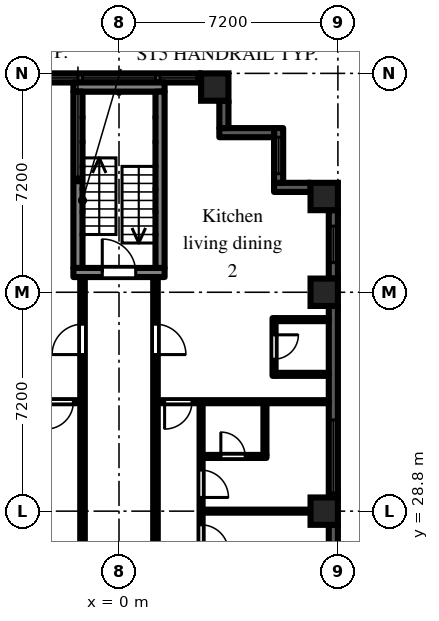
"""IFC4 building model, lengths in metres.
Left out: names, types, materials, properties, quantities, classifications, styles, units other than length and angle.
Written with IfcOpenShell. Run it as: python <this file> out.ifc"""

import sys

from ifc_helpers import new_model, si_unit, direction, frame, frame_2d, origin, origin_2d, place, context, subcontext, project, spatial, rectangle, extrude, element, fill, save


model = new_model("IFC4")
c1 = context("Model", 3, precision=1e-05, world=origin(), true_north=direction((0.0, 1.0)))
c2 = subcontext(c1, "Body", "Model", "MODEL_VIEW")
j1 = project(units=[si_unit("LENGTHUNIT", "METRE"), si_unit("PLANEANGLEUNIT", "RADIAN")], contexts=[c1])
p1 = place(None, origin())
s1 = spatial("IfcSite", under=j1, at=p1, CompositionType="ELEMENT")
p2 = place(p1, origin())
s2 = spatial("IfcBuilding", under=s1, at=p2, CompositionType="ELEMENT")
p3 = place(p2, frame((0.0, 0.0, 11.7)))
s3 = spatial("IfcBuildingStorey", under=s2, at=p3, CompositionType="ELEMENT", Elevation=11.7)
for number, where, z_axis, x_axis in (
    (1, (3.15, 42.75, 0.0), (0.0, 0.0, 1.0), (1.0, 0.0, 0.0)),
    (2, (6.75, 28.8, 0.0), (0.0, 0.0, 1.0), (1.0, 0.0, 0.0)),
    (3, (6.75, 36.0, 0.0), (0.0, 0.0, 1.0), (1.0, 0.0, 0.0)),
    (4, (6.75, 39.15, 0.0), (0.0, 0.0, 1.0), (1.0, 0.0, 0.0)),
):
    element("IfcColumn", number, at=place(p3, frame(where, z_axis=z_axis, x_axis=x_axis)), inside=s3, PredefinedType="COLUMN", context=c2, shape_type="SweptSolid", body=[
        extrude(rectangle(XDim=0.9, YDim=0.9, at=origin_2d()), origin(), (0.0, 0.0, 1.0), 3.0),
    ])
p4 = place(p3, frame((7.05, 22.05, 0.0), z_axis=(0.0, 0.0, 1.0), x_axis=(0.0, 1.0, 0.0)))
e5 = element("IfcWall", 5, at=p4, inside=s3, PredefinedType="SOLIDWALL", context=c2, shape_type="SweptSolid", body=[
    extrude(rectangle(XDim=6.3, YDim=0.3, at=frame_2d((3.15, 0.0))), origin(), (0.0, 0.0, 1.0), 2.1),
])
p5 = place(p4, frame((0.975, 0.0, 0.2)))
e6 = element("IfcOpeningElement", 6, at=p5, cuts=e5, PredefinedType="OPENING", context=c2, shape_type="SweptSolid", body=[
    extrude(rectangle(XDim=1.2, YDim=1.85, at=frame_2d((0.6, 0.925))), frame((0.0, 0.16, 0.0), z_axis=(0.0, -1.0, 0.0), x_axis=(1.0, 0.0, 0.0)), (0.0, 0.0, 1.0), 0.32),
])
p6 = place(p4, frame((4.125, 0.0, 0.2)))
e7 = element("IfcOpeningElement", 7, at=p6, cuts=e5, PredefinedType="OPENING", context=c2, shape_type="SweptSolid", body=[
    extrude(rectangle(XDim=1.2, YDim=1.85, at=frame_2d((0.6, 0.925))), frame((0.0, 0.16, 0.0), z_axis=(0.0, -1.0, 0.0), x_axis=(1.0, 0.0, 0.0)), (0.0, 0.0, 1.0), 0.32),
])
p7 = place(p3, frame((7.05, 29.25, 0.0), z_axis=(0.0, 0.0, 1.0), x_axis=(0.0, 1.0, 0.0)))
e8 = element("IfcWall", 8, at=p7, inside=s3, PredefinedType="SOLIDWALL", context=c2, shape_type="SweptSolid", body=[
    extrude(rectangle(XDim=6.3, YDim=0.3, at=frame_2d((3.15, 0.0))), origin(), (0.0, 0.0, 1.0), 2.1),
])
p8 = place(p7, frame((0.15, 0.0, 0.2)))
e9 = element("IfcOpeningElement", 9, at=p8, cuts=e8, PredefinedType="OPENING", context=c2, shape_type="SweptSolid", body=[
    extrude(rectangle(XDim=2.4, YDim=1.85, at=frame_2d((1.2, 0.925))), frame((0.0, 0.16, 0.0), z_axis=(0.0, -1.0, 0.0), x_axis=(1.0, 0.0, 0.0)), (0.0, 0.0, 1.0), 0.32),
])
p9 = place(p3, frame((7.05, 36.45, 0.0), z_axis=(0.0, 0.0, 1.0), x_axis=(0.0, 1.0, 0.0)))
e10 = element("IfcWall", 10, at=p9, inside=s3, PredefinedType="SOLIDWALL", context=c2, shape_type="SweptSolid", body=[
    extrude(rectangle(XDim=2.25, YDim=0.3, at=frame_2d((1.125, 0.0))), origin(), (0.0, 0.0, 1.0), 2.1),
])
p10 = place(p9, frame((0.525, 0.0, 0.2)))
e11 = element("IfcOpeningElement", 11, at=p10, cuts=e10, PredefinedType="OPENING", context=c2, shape_type="SweptSolid", body=[
    extrude(rectangle(XDim=1.2, YDim=1.85, at=frame_2d((0.6, 0.925))), frame((0.0, 0.16, 0.0), z_axis=(0.0, -1.0, 0.0), x_axis=(1.0, 0.0, 0.0)), (0.0, 0.0, 1.0), 0.32),
])
p11 = place(p3, frame((6.3, 39.45, 0.0), z_axis=(0.0, 0.0, 1.0), x_axis=(-1.0, 0.0, 0.0)))
e12 = element("IfcWall", 12, at=p11, inside=s3, PredefinedType="SOLIDWALL", context=c2, shape_type="SweptSolid", body=[
    extrude(rectangle(XDim=1.2, YDim=0.3, at=frame_2d((0.6, 0.0))), origin(), (0.0, 0.0, 1.0), 2.575),
])
p12 = place(p3, frame((5.25, 39.6, 0.0), z_axis=(0.0, 0.0, 1.0), x_axis=(0.0, 1.0, 0.0)))
e13 = element("IfcWall", 13, at=p12, inside=s3, PredefinedType="SOLIDWALL", context=c2, shape_type="SweptSolid", body=[
    extrude(rectangle(XDim=1.8, YDim=0.3, at=frame_2d((0.9, 0.0))), origin(), (0.0, 0.0, 1.0), 2.575),
])
p13 = place(p12, frame((0.3, 0.0, 0.2)))
e14 = element("IfcOpeningElement", 14, at=p13, cuts=e13, PredefinedType="OPENING", context=c2, shape_type="SweptSolid", body=[
    extrude(rectangle(XDim=1.2, YDim=1.85, at=frame_2d((0.6, 0.925))), frame((0.0, 0.16, 0.0), z_axis=(0.0, -1.0, 0.0), x_axis=(1.0, 0.0, 0.0)), (0.0, 0.0, 1.0), 0.32),
])
p14 = place(p3, frame((5.1, 41.25, 0.0), z_axis=(0.0, 0.0, 1.0), x_axis=(-1.0, 0.0, 0.0)))
e15 = element("IfcWall", 15, at=p14, inside=s3, PredefinedType="SOLIDWALL", context=c2, shape_type="SweptSolid", body=[
    extrude(rectangle(XDim=1.8, YDim=0.3, at=frame_2d((0.9, 0.0))), origin(), (0.0, 0.0, 1.0), 2.575),
])
p15 = place(p3, frame((3.45, 41.4, 0.0), z_axis=(0.0, 0.0, 1.0), x_axis=(0.0, 1.0, 0.0)))
e16 = element("IfcWall", 16, at=p15, inside=s3, PredefinedType="SOLIDWALL", context=c2, shape_type="SweptSolid", body=[
    extrude(rectangle(XDim=0.9, YDim=0.3, at=frame_2d((0.45, 0.0))), origin(), (0.0, 0.0, 1.0), 2.575),
])
p16 = place(p3, frame((2.7, 43.05, 0.0), z_axis=(0.0, 0.0, 1.0), x_axis=(-1.0, 0.0, 0.0)))
e17 = element("IfcWall", 17, at=p16, inside=s3, PredefinedType="SOLIDWALL", context=c2, shape_type="SweptSolid", body=[
    extrude(rectangle(XDim=5.4, YDim=0.3, at=frame_2d((2.7, 0.0))), origin(), (0.0, 0.0, 1.0), 2.1),
])
p17 = place(p16, frame((1.5, 0.0, 0.2)))
e18 = element("IfcOpeningElement", 18, at=p17, cuts=e17, PredefinedType="OPENING", context=c2, shape_type="SweptSolid", body=[
    extrude(rectangle(XDim=2.4, YDim=1.85, at=frame_2d((1.2, 0.925))), frame((0.0, 0.16, 0.0), z_axis=(0.0, -1.0, 0.0), x_axis=(1.0, 0.0, 0.0)), (0.0, 0.0, 1.0), 0.32),
])
p18 = place(p16, frame((0.15, 0.0, 0.2)))
e19 = element("IfcOpeningElement", 19, at=p18, cuts=e17, PredefinedType="OPENING", context=c2, shape_type="SweptSolid", body=[
    extrude(rectangle(XDim=1.2, YDim=1.85, at=frame_2d((0.6, 0.925))), frame((0.0, 0.16, 0.0), z_axis=(0.0, -1.0, 0.0), x_axis=(1.0, 0.0, 0.0)), (0.0, 0.0, 1.0), 0.32),
])
p19 = place(p16, frame((4.05, 0.0, 0.2)))
e20 = element("IfcOpeningElement", 20, at=p19, cuts=e17, PredefinedType="OPENING", context=c2, shape_type="SweptSolid", body=[
    extrude(rectangle(XDim=1.2, YDim=1.85, at=frame_2d((0.6, 0.925))), frame((0.0, 0.16, 0.0), z_axis=(0.0, -1.0, 0.0), x_axis=(1.0, 0.0, 0.0)), (0.0, 0.0, 1.0), 0.32),
])
p20 = place(p3, frame((-1.5, 36.65, 0.0), z_axis=(0.0, 0.0, 1.0), x_axis=(1.0, 0.0, 0.0)))
e21 = element("IfcWall", 21, at=p20, inside=s3, PredefinedType="SHEAR", context=c2, shape_type="SweptSolid", body=[
    extrude(rectangle(XDim=3.0, YDim=0.3, at=frame_2d((1.5, 0.0))), origin(), (0.0, 0.0, 1.0), 2.575),
])
p21 = place(p20, frame((0.95, 0.0, 0.0)))
e22 = element("IfcOpeningElement", 22, at=p21, cuts=e21, PredefinedType="OPENING", context=c2, shape_type="SweptSolid", body=[
    extrude(rectangle(XDim=1.1, YDim=2.1, at=frame_2d((0.55, 1.05))), frame((0.0, 0.16, 0.0), z_axis=(0.0, -1.0, 0.0), x_axis=(1.0, 0.0, 0.0)), (0.0, 0.0, 1.0), 0.32),
])
p22 = place(p3, frame((-1.5, 42.75, 0.0), z_axis=(0.0, 0.0, 1.0), x_axis=(1.0, 0.0, 0.0)))
e23 = element("IfcWall", 23, at=p22, inside=s3, PredefinedType="SHEAR", context=c2, shape_type="SweptSolid", body=[
    extrude(rectangle(XDim=3.0, YDim=0.3, at=frame_2d((1.5, 0.0))), origin(), (0.0, 0.0, 1.0), 2.575),
])
for number, where, z_axis, x_axis in (
    (24, (-1.35, 36.8, 0.0), (0.0, 0.0, 1.0), (0.0, 1.0, 0.0)),
    (25, (1.35, 36.8, 0.0), (0.0, 0.0, 1.0), (0.0, 1.0, 0.0)),
):
    element("IfcWall", number, at=place(p3, frame(where, z_axis=z_axis, x_axis=x_axis)), inside=s3, PredefinedType="SHEAR", context=c2, shape_type="SweptSolid", body=[
        extrude(rectangle(XDim=5.8, YDim=0.3, at=frame_2d((2.9, 0.0))), origin(), (0.0, 0.0, 1.0), 2.575),
    ])
p23 = place(p3, frame((-6.9, 32.4, 0.0), z_axis=(0.0, 0.0, 1.0), x_axis=(1.0, 0.0, 0.0)))
e26 = element("IfcWall", 26, at=p23, inside=s3, PredefinedType="PARTITIONING", context=c2, shape_type="SweptSolid", body=[
    extrude(rectangle(XDim=5.625, YDim=0.1, at=frame_2d((2.812, 0.0))), origin(), (0.0, 0.0, 1.0), 2.575),
])
p24 = place(p23, frame((4.5, 0.0, 0.0)))
e27 = element("IfcOpeningElement", 27, at=p24, cuts=e26, PredefinedType="OPENING", context=c2, shape_type="SweptSolid", body=[
    extrude(rectangle(XDim=0.9, YDim=2.1, at=frame_2d((0.45, 1.05))), frame((0.0, 0.06, 0.0), z_axis=(0.0, -1.0, 0.0), x_axis=(1.0, 0.0, 0.0)), (0.0, 0.0, 1.0), 0.12),
])
p25 = place(p3, frame((-1.2, 1.125, 0.0), z_axis=(0.0, 0.0, 1.0), x_axis=(0.0, 1.0, 0.0)))
e28 = element("IfcWall", 28, at=p25, inside=s3, PredefinedType="PARTITIONING", context=c2, shape_type="SweptSolid", body=[
    extrude(rectangle(XDim=35.375, YDim=0.15, at=frame_2d((17.688, 0.0))), origin(), (0.0, 0.0, 1.0), 2.575),
])
p26 = place(p25, frame((2.625, 0.0, 0.0)))
e29 = element("IfcOpeningElement", 29, at=p26, cuts=e28, PredefinedType="OPENING", context=c2, shape_type="SweptSolid", body=[
    extrude(rectangle(XDim=0.9, YDim=2.1, at=frame_2d((0.45, 1.05))), frame((0.0, 0.085, 0.0), z_axis=(0.0, -1.0, 0.0), x_axis=(1.0, 0.0, 0.0)), (0.0, 0.0, 1.0), 0.17),
])
p27 = place(p25, frame((11.025, 0.0, 0.0)))
e30 = element("IfcOpeningElement", 30, at=p27, cuts=e28, PredefinedType="OPENING", context=c2, shape_type="SweptSolid", body=[
    extrude(rectangle(XDim=0.9, YDim=2.1, at=frame_2d((0.45, 1.05))), frame((0.0, 0.085, 0.0), z_axis=(0.0, -1.0, 0.0), x_axis=(1.0, 0.0, 0.0)), (0.0, 0.0, 1.0), 0.17),
])
p28 = place(p25, frame((32.825, 0.0, 0.0)))
e31 = element("IfcOpeningElement", 31, at=p28, cuts=e28, PredefinedType="OPENING", context=c2, shape_type="SweptSolid", body=[
    extrude(rectangle(XDim=1.0, YDim=2.1, at=frame_2d((0.5, 1.05))), frame((0.0, 0.085, 0.0), z_axis=(0.0, -1.0, 0.0), x_axis=(1.0, 0.0, 0.0)), (0.0, 0.0, 1.0), 0.17),
])
p29 = place(p3, frame((1.2, 1.125, 0.0), z_axis=(0.0, 0.0, 1.0), x_axis=(0.0, 1.0, 0.0)))
e32 = element("IfcWall", 32, at=p29, inside=s3, PredefinedType="PARTITIONING", context=c2, shape_type="SweptSolid", body=[
    extrude(rectangle(XDim=35.375, YDim=0.15, at=frame_2d((17.688, 0.0))), origin(), (0.0, 0.0, 1.0), 2.575),
])
p30 = place(p29, frame((2.625, 0.0, 0.0)))
e33 = element("IfcOpeningElement", 33, at=p30, cuts=e32, PredefinedType="OPENING", context=c2, shape_type="SweptSolid", body=[
    extrude(rectangle(XDim=0.9, YDim=2.1, at=frame_2d((0.45, 1.05))), frame((0.0, 0.085, 0.0), z_axis=(0.0, -1.0, 0.0), x_axis=(1.0, 0.0, 0.0)), (0.0, 0.0, 1.0), 0.17),
])
p31 = place(p29, frame((11.425, 0.0, 0.0)))
e34 = element("IfcOpeningElement", 34, at=p31, cuts=e32, PredefinedType="OPENING", context=c2, shape_type="SweptSolid", body=[
    extrude(rectangle(XDim=0.9, YDim=2.1, at=frame_2d((0.45, 1.05))), frame((0.0, 0.085, 0.0), z_axis=(0.0, -1.0, 0.0), x_axis=(1.0, 0.0, 0.0)), (0.0, 0.0, 1.0), 0.17),
])
p32 = place(p29, frame((7.825, 0.0, 0.0)))
e35 = element("IfcOpeningElement", 35, at=p32, cuts=e32, PredefinedType="OPENING", context=c2, shape_type="SweptSolid", body=[
    extrude(rectangle(XDim=0.9, YDim=2.1, at=frame_2d((0.45, 1.05))), frame((0.0, 0.085, 0.0), z_axis=(0.0, -1.0, 0.0), x_axis=(1.0, 0.0, 0.0)), (0.0, 0.0, 1.0), 0.17),
])
p33 = place(p29, frame((32.825, 0.0, 0.0)))
e36 = element("IfcOpeningElement", 36, at=p33, cuts=e32, PredefinedType="OPENING", context=c2, shape_type="SweptSolid", body=[
    extrude(rectangle(XDim=1.0, YDim=2.1, at=frame_2d((0.5, 1.05))), frame((0.0, 0.085, 0.0), z_axis=(0.0, -1.0, 0.0), x_axis=(1.0, 0.0, 0.0)), (0.0, 0.0, 1.0), 0.17),
])
p34 = place(p3, frame((1.275, 32.4, 0.0), z_axis=(0.0, 0.0, 1.0), x_axis=(1.0, 0.0, 0.0)))
e37 = element("IfcWall", 37, at=p34, inside=s3, PredefinedType="PARTITIONING", context=c2, shape_type="SweptSolid", body=[
    extrude(rectangle(XDim=5.625, YDim=0.1, at=frame_2d((2.812, 0.0))), origin(), (0.0, 0.0, 1.0), 2.575),
])
p35 = place(p34, frame((0.225, 0.0, 0.0)))
e38 = element("IfcOpeningElement", 38, at=p35, cuts=e37, PredefinedType="OPENING", context=c2, shape_type="SweptSolid", body=[
    extrude(rectangle(XDim=0.9, YDim=2.1, at=frame_2d((0.45, 1.05))), frame((0.0, 0.06, 0.0), z_axis=(0.0, -1.0, 0.0), x_axis=(1.0, 0.0, 0.0)), (0.0, 0.0, 1.0), 0.12),
])
p36 = place(p3, frame((2.7, 14.462, 0.0), z_axis=(0.0, 0.0, 1.0), x_axis=(0.0, 1.0, 0.0)))
e39 = element("IfcWall", 39, at=p36, inside=s3, PredefinedType="PARTITIONING", context=c2, shape_type="SweptSolid", body=[
    extrude(rectangle(XDim=17.888, YDim=0.1, at=frame_2d((8.944, 0.0))), origin(), (0.0, 0.0, 1.0), 2.575),
])
p37 = place(p36, frame((2.188, 0.0, 0.0)))
e40 = element("IfcOpeningElement", 40, at=p37, cuts=e39, PredefinedType="OPENING", context=c2, shape_type="SweptSolid", body=[
    extrude(rectangle(XDim=0.9, YDim=2.1, at=frame_2d((0.45, 1.05))), frame((0.0, 0.06, 0.0), z_axis=(0.0, -1.0, 0.0), x_axis=(1.0, 0.0, 0.0)), (0.0, 0.0, 1.0), 0.12),
])
p38 = place(p36, frame((5.788, 0.0, 0.0)))
e41 = element("IfcOpeningElement", 41, at=p38, cuts=e39, PredefinedType="OPENING", context=c2, shape_type="SweptSolid", body=[
    extrude(rectangle(XDim=0.9, YDim=2.1, at=frame_2d((0.45, 1.05))), frame((0.0, 0.06, 0.0), z_axis=(0.0, -1.0, 0.0), x_axis=(1.0, 0.0, 0.0)), (0.0, 0.0, 1.0), 0.12),
])
p39 = place(p36, frame((7.587, 0.0, 0.0)))
e42 = element("IfcOpeningElement", 42, at=p39, cuts=e39, PredefinedType="OPENING", context=c2, shape_type="SweptSolid", body=[
    extrude(rectangle(XDim=0.9, YDim=2.1, at=frame_2d((0.45, 1.05))), frame((0.0, 0.06, 0.0), z_axis=(0.0, -1.0, 0.0), x_axis=(1.0, 0.0, 0.0)), (0.0, 0.0, 1.0), 0.12),
])
p40 = place(p36, frame((12.988, 0.0, 0.0)))
e43 = element("IfcOpeningElement", 43, at=p40, cuts=e39, PredefinedType="OPENING", context=c2, shape_type="SweptSolid", body=[
    extrude(rectangle(XDim=0.9, YDim=2.1, at=frame_2d((0.45, 1.05))), frame((0.0, 0.06, 0.0), z_axis=(0.0, -1.0, 0.0), x_axis=(1.0, 0.0, 0.0)), (0.0, 0.0, 1.0), 0.12),
])
p41 = place(p36, frame((14.788, 0.0, 0.0)))
e44 = element("IfcOpeningElement", 44, at=p41, cuts=e39, PredefinedType="OPENING", context=c2, shape_type="SweptSolid", body=[
    extrude(rectangle(XDim=0.9, YDim=2.1, at=frame_2d((0.45, 1.05))), frame((0.0, 0.06, 0.0), z_axis=(0.0, -1.0, 0.0), x_axis=(1.0, 0.0, 0.0)), (0.0, 0.0, 1.0), 0.12),
])
p42 = place(p3, frame((2.75, 28.8, 0.0), z_axis=(0.0, 0.0, 1.0), x_axis=(1.0, 0.0, 0.0)))
e45 = element("IfcWall", 45, at=p42, inside=s3, PredefinedType="PARTITIONING", context=c2, shape_type="SweptSolid", body=[
    extrude(rectangle(XDim=4.15, YDim=0.1, at=frame_2d((2.075, 0.0))), origin(), (0.0, 0.0, 1.0), 2.575),
])
p43 = place(p3, frame((2.75, 30.6, 0.0), z_axis=(0.0, 0.0, 1.0), x_axis=(1.0, 0.0, 0.0)))
e46 = element("IfcWall", 46, at=p43, inside=s3, PredefinedType="PARTITIONING", context=c2, shape_type="SweptSolid", body=[
    extrude(rectangle(XDim=2.1, YDim=0.1, at=frame_2d((1.05, 0.0))), origin(), (0.0, 0.0, 1.0), 2.575),
])
p44 = place(p43, frame((0.6, 0.0, 0.0)))
e47 = element("IfcOpeningElement", 47, at=p44, cuts=e46, PredefinedType="OPENING", context=c2, shape_type="SweptSolid", body=[
    extrude(rectangle(XDim=0.8, YDim=2.1, at=frame_2d((0.4, 1.05))), frame((0.0, 0.06, 0.0), z_axis=(0.0, -1.0, 0.0), x_axis=(1.0, 0.0, 0.0)), (0.0, 0.0, 1.0), 0.12),
])
p45 = place(p3, frame((4.8, 30.65, 0.0), z_axis=(0.0, 0.0, 1.0), x_axis=(0.0, 1.0, 0.0)))
e48 = element("IfcWall", 48, at=p45, inside=s3, PredefinedType="PARTITIONING", context=c2, shape_type="SweptSolid", body=[
    extrude(rectangle(XDim=1.7, YDim=0.1, at=frame_2d((0.85, 0.0))), origin(), (0.0, 0.0, 1.0), 2.575),
])
p46 = place(p3, frame((5.1, 33.25, 0.0), z_axis=(0.0, 0.0, 1.0), x_axis=(0.0, 1.0, 0.0)))
e49 = element("IfcWall", 49, at=p46, inside=s3, PredefinedType="PARTITIONING", context=c2, shape_type="SweptSolid", body=[
    extrude(rectangle(XDim=1.9, YDim=0.1, at=frame_2d((0.95, 0.0))), origin(), (0.0, 0.0, 1.0), 2.575),
])
p47 = place(p46, frame((0.55, 0.0, 0.0)))
e50 = element("IfcOpeningElement", 50, at=p47, cuts=e49, PredefinedType="OPENING", context=c2, shape_type="SweptSolid", body=[
    extrude(rectangle(XDim=0.8, YDim=2.1, at=frame_2d((0.4, 1.05))), frame((0.0, 0.06, 0.0), z_axis=(0.0, -1.0, 0.0), x_axis=(1.0, 0.0, 0.0)), (0.0, 0.0, 1.0), 0.12),
])
for number, where, z_axis, x_axis in (
    (51, (5.15, 33.3, 0.0), (0.0, 0.0, 1.0), (1.0, 0.0, 0.0)),
    (52, (5.15, 35.1, 0.0), (0.0, 0.0, 1.0), (1.0, 0.0, 0.0)),
):
    element("IfcWall", number, at=place(p3, frame(where, z_axis=z_axis, x_axis=x_axis)), inside=s3, PredefinedType="PARTITIONING", context=c2, shape_type="SweptSolid", body=[
        extrude(rectangle(XDim=1.75, YDim=0.1, at=frame_2d((0.875, 0.0))), origin(), (0.0, 0.0, 1.0), 2.575),
    ])
p48 = place(p8, origin())
e53 = element("IfcWindow", 53, at=p48, inside=s3, PartitioningType="SINGLE_PANEL", PredefinedType="WINDOW", context=c2, shape_type="SweptSolid", body=[
    extrude(rectangle(XDim=2.4, YDim=1.85, at=frame_2d((1.2, 0.925))), frame((0.0, 0.03, 0.0), z_axis=(0.0, -1.0, 0.0), x_axis=(1.0, 0.0, 0.0)), (0.0, 0.0, 1.0), 0.06),
])
fill(e9, e53)
p49 = place(p10, origin())
e54 = element("IfcWindow", 54, at=p49, inside=s3, PartitioningType="SINGLE_PANEL", PredefinedType="WINDOW", context=c2, shape_type="SweptSolid", body=[
    extrude(rectangle(XDim=1.2, YDim=1.85, at=frame_2d((0.6, 0.925))), frame((0.0, 0.03, 0.0), z_axis=(0.0, -1.0, 0.0), x_axis=(1.0, 0.0, 0.0)), (0.0, 0.0, 1.0), 0.06),
])
fill(e11, e54)
p50 = place(p13, origin())
e55 = element("IfcWindow", 55, at=p50, inside=s3, PartitioningType="SINGLE_PANEL", PredefinedType="WINDOW", context=c2, shape_type="SweptSolid", body=[
    extrude(rectangle(XDim=1.2, YDim=1.85, at=frame_2d((0.6, 0.925))), frame((0.0, 0.03, 0.0), z_axis=(0.0, -1.0, 0.0), x_axis=(1.0, 0.0, 0.0)), (0.0, 0.0, 1.0), 0.06),
])
fill(e14, e55)
p51 = place(p17, origin())
e56 = element("IfcWindow", 56, at=p51, inside=s3, PartitioningType="SINGLE_PANEL", PredefinedType="WINDOW", context=c2, shape_type="SweptSolid", body=[
    extrude(rectangle(XDim=2.4, YDim=1.85, at=frame_2d((1.2, 0.925))), frame((0.0, 0.03, 0.0), z_axis=(0.0, -1.0, 0.0), x_axis=(1.0, 0.0, 0.0)), (0.0, 0.0, 1.0), 0.06),
])
fill(e18, e56)
p52 = place(p18, origin())
e57 = element("IfcWindow", 57, at=p52, inside=s3, PartitioningType="SINGLE_PANEL", PredefinedType="WINDOW", context=c2, shape_type="SweptSolid", body=[
    extrude(rectangle(XDim=1.2, YDim=1.85, at=frame_2d((0.6, 0.925))), frame((0.0, 0.03, 0.0), z_axis=(0.0, -1.0, 0.0), x_axis=(1.0, 0.0, 0.0)), (0.0, 0.0, 1.0), 0.06),
])
fill(e19, e57)
p53 = place(p19, origin())
e58 = element("IfcWindow", 58, at=p53, inside=s3, PartitioningType="SINGLE_PANEL", PredefinedType="WINDOW", context=c2, shape_type="SweptSolid", body=[
    extrude(rectangle(XDim=1.2, YDim=1.85, at=frame_2d((0.6, 0.925))), frame((0.0, 0.03, 0.0), z_axis=(0.0, -1.0, 0.0), x_axis=(1.0, 0.0, 0.0)), (0.0, 0.0, 1.0), 0.06),
])
fill(e20, e58)
p54 = place(p21, origin())
e59 = element("IfcDoor", 59, at=p54, inside=s3, OperationType="SINGLE_SWING_LEFT", PredefinedType="DOOR", context=c2, shape_type="SweptSolid", body=[
    extrude(rectangle(XDim=1.1, YDim=2.1, at=frame_2d((0.55, 1.05))), frame((0.0, 0.025, 0.0), z_axis=(0.0, -1.0, 0.0), x_axis=(1.0, 0.0, 0.0)), (0.0, 0.0, 1.0), 0.05),
])
fill(e22, e59)
p55 = place(p28, origin())
e60 = element("IfcDoor", 60, at=p55, inside=s3, OperationType="SINGLE_SWING_LEFT", PredefinedType="DOOR", context=c2, shape_type="SweptSolid", body=[
    extrude(rectangle(XDim=1.0, YDim=2.1, at=frame_2d((0.5, 1.05))), frame((0.0, 0.025, 0.0), z_axis=(0.0, -1.0, 0.0), x_axis=(1.0, 0.0, 0.0)), (0.0, 0.0, 1.0), 0.05),
])
fill(e31, e60)
p56 = place(p24, frame((0.9, 0.0, 0.0), z_axis=(0.0, 0.0, 1.0), x_axis=(-1.0, 0.0, 0.0)))
e61 = element("IfcDoor", 61, at=p56, inside=s3, OperationType="SINGLE_SWING_RIGHT", PredefinedType="DOOR", context=c2, shape_type="SweptSolid", body=[
    extrude(rectangle(XDim=0.9, YDim=2.1, at=frame_2d((0.45, 1.05))), frame((0.0, 0.025, 0.0), z_axis=(0.0, -1.0, 0.0), x_axis=(1.0, 0.0, 0.0)), (0.0, 0.0, 1.0), 0.05),
])
fill(e27, e61)
p57 = place(p47, frame((0.8, 0.0, 0.0), z_axis=(0.0, 0.0, 1.0), x_axis=(-1.0, 0.0, 0.0)))
e62 = element("IfcDoor", 62, at=p57, inside=s3, OperationType="SINGLE_SWING_LEFT", PredefinedType="DOOR", context=c2, shape_type="SweptSolid", body=[
    extrude(rectangle(XDim=0.8, YDim=2.1, at=frame_2d((0.4, 1.05))), frame((0.0, 0.025, 0.0), z_axis=(0.0, -1.0, 0.0), x_axis=(1.0, 0.0, 0.0)), (0.0, 0.0, 1.0), 0.05),
])
fill(e50, e62)
p58 = place(p33, frame((1.0, 0.0, 0.0), z_axis=(0.0, 0.0, 1.0), x_axis=(-1.0, 0.0, 0.0)))
e63 = element("IfcDoor", 63, at=p58, inside=s3, OperationType="SINGLE_SWING_RIGHT", PredefinedType="DOOR", context=c2, shape_type="SweptSolid", body=[
    extrude(rectangle(XDim=1.0, YDim=2.1, at=frame_2d((0.5, 1.05))), frame((0.0, 0.025, 0.0), z_axis=(0.0, -1.0, 0.0), x_axis=(1.0, 0.0, 0.0)), (0.0, 0.0, 1.0), 0.05),
])
fill(e36, e63)
p59 = place(p35, frame((0.9, 0.0, 0.0), z_axis=(0.0, 0.0, 1.0), x_axis=(-1.0, 0.0, 0.0)))
e64 = element("IfcDoor", 64, at=p59, inside=s3, OperationType="SINGLE_SWING_RIGHT", PredefinedType="DOOR", context=c2, shape_type="SweptSolid", body=[
    extrude(rectangle(XDim=0.9, YDim=2.1, at=frame_2d((0.45, 1.05))), frame((0.0, 0.025, 0.0), z_axis=(0.0, -1.0, 0.0), x_axis=(1.0, 0.0, 0.0)), (0.0, 0.0, 1.0), 0.05),
])
fill(e38, e64)
p60 = place(p40, frame((0.9, 0.0, 0.0), z_axis=(0.0, 0.0, 1.0), x_axis=(-1.0, 0.0, 0.0)))
e65 = element("IfcDoor", 65, at=p60, inside=s3, OperationType="SINGLE_SWING_RIGHT", PredefinedType="DOOR", context=c2, shape_type="SweptSolid", body=[
    extrude(rectangle(XDim=0.9, YDim=2.1, at=frame_2d((0.45, 1.05))), frame((0.0, 0.025, 0.0), z_axis=(0.0, -1.0, 0.0), x_axis=(1.0, 0.0, 0.0)), (0.0, 0.0, 1.0), 0.05),
])
fill(e43, e65)
p61 = place(p41, frame((0.9, 0.0, 0.0), z_axis=(0.0, 0.0, 1.0), x_axis=(-1.0, 0.0, 0.0)))
e66 = element("IfcDoor", 66, at=p61, inside=s3, OperationType="SINGLE_SWING_RIGHT", PredefinedType="DOOR", context=c2, shape_type="SweptSolid", body=[
    extrude(rectangle(XDim=0.9, YDim=2.1, at=frame_2d((0.45, 1.05))), frame((0.0, 0.025, 0.0), z_axis=(0.0, -1.0, 0.0), x_axis=(1.0, 0.0, 0.0)), (0.0, 0.0, 1.0), 0.05),
])
fill(e44, e66)
p62 = place(p44, origin())
e67 = element("IfcDoor", 67, at=p62, inside=s3, OperationType="SINGLE_SWING_LEFT", PredefinedType="DOOR", context=c2, shape_type="SweptSolid", body=[
    extrude(rectangle(XDim=0.8, YDim=2.1, at=frame_2d((0.4, 1.05))), frame((0.0, 0.025, 0.0), z_axis=(0.0, -1.0, 0.0), x_axis=(1.0, 0.0, 0.0)), (0.0, 0.0, 1.0), 0.05),
])
fill(e47, e67)
save(model, sys.argv[1])
